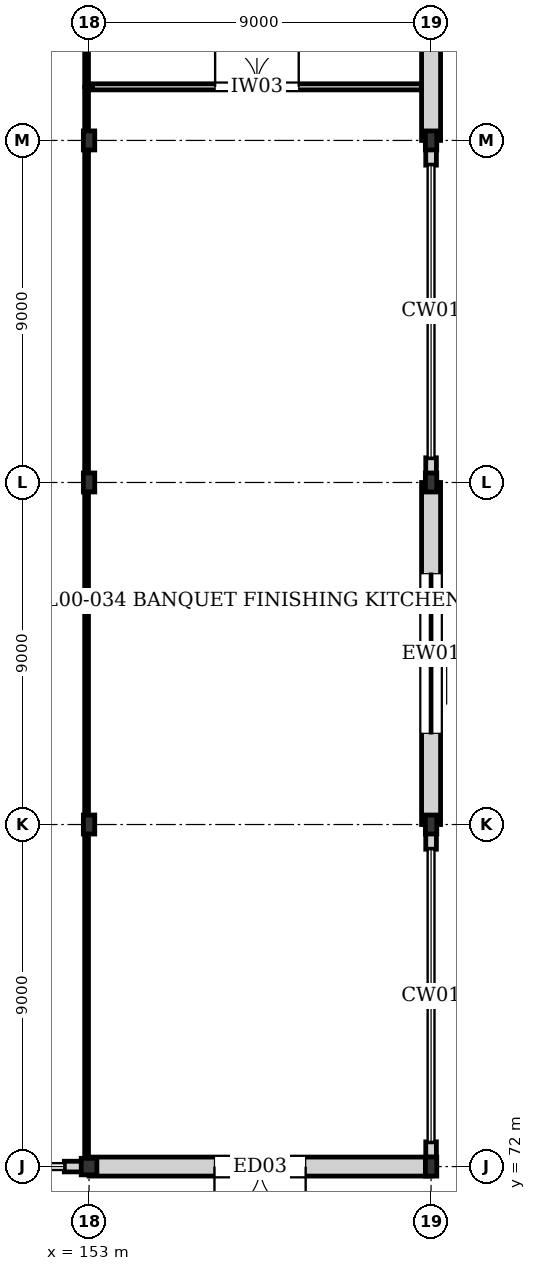
"""IFC4 building model, lengths in metres.
Left out: names, types, materials, properties, quantities, classifications, styles, units other than length and angle.
Written with IfcOpenShell. Run it as: python <this file> out.ifc"""

import sys

from ifc_helpers import new_model, si_unit, direction, frame, frame_2d, origin, origin_2d, place, context, subcontext, project, spatial, rectangle, i_section, extrude, element, fill, save


model = new_model("IFC4")
c1 = context("Model", 3, precision=1e-05, world=origin(), true_north=direction((0.0, 1.0)))
c2 = subcontext(c1, "Body", "Model", "MODEL_VIEW")
j1 = project(units=[si_unit("LENGTHUNIT", "METRE"), si_unit("PLANEANGLEUNIT", "RADIAN")], contexts=[c1])
p1 = place(None, origin())
s1 = spatial("IfcSite", under=j1, at=p1, CompositionType="ELEMENT")
p2 = place(p1, origin())
s2 = spatial("IfcBuilding", under=s1, at=p2, CompositionType="ELEMENT")
p3 = place(p2, origin())
s3 = spatial("IfcBuildingStorey", under=s2, at=p3, CompositionType="ELEMENT", Elevation=0.0)
p4 = place(p3, frame((153.0, 72.0, 0.0), z_axis=(0.0, 0.0, 1.0), x_axis=(1.0, 0.0, 0.0)))
e1 = element("IfcColumn", 1, at=p4, inside=s3, PredefinedType="COLUMN", context=c2, shape_type="SweptSolid", body=[
    extrude(i_section(OverallWidth=0.412, OverallDepth=0.435, WebThickness=0.027, FlangeThickness=0.046, at=origin_2d()), origin(), (0.0, 0.0, 1.0), 4.32),
])
for number, where, z_axis, x_axis in (
    (2, (153.0, 81.0, 0.0), (0.0, 0.0, 1.0), (1.0, 0.0, 0.0)),
    (3, (153.0, 90.0, 0.0), (0.0, 0.0, 1.0), (1.0, 0.0, 0.0)),
    (4, (153.0, 99.0, 0.0), (0.0, 0.0, 1.0), (1.0, 0.0, 0.0)),
    (5, (162.0, 72.0, 0.0), (0.0, 0.0, 1.0), (1.0, 0.0, 0.0)),
    (6, (162.0, 81.0, 0.0), (0.0, 0.0, 1.0), (1.0, 0.0, 0.0)),
    (7, (162.0, 90.0, 0.0), (0.0, 0.0, 1.0), (1.0, 0.0, 0.0)),
    (8, (162.0, 99.0, 0.0), (0.0, 0.0, 1.0), (1.0, 0.0, 0.0)),
):
    element("IfcColumn", number, at=place(p3, frame(where, z_axis=z_axis, x_axis=x_axis)), inside=s3, PredefinedType="COLUMN", context=c2, shape_type="SweptSolid", body=[
        extrude(i_section(OverallWidth=0.3, OverallDepth=0.5, WebThickness=0.014, FlangeThickness=0.028, at=origin_2d()), origin(), (0.0, 0.0, 1.0), 4.32),
    ])
p5 = place(p3, frame((162.0, 108.0, 0.0), z_axis=(0.0, 0.0, 1.0), x_axis=(0.0, -1.0, 0.0)))
e9 = element("IfcWall", 9, at=p5, inside=s3, PredefinedType="SOLIDWALL", context=c2, shape_type="SweptSolid", body=[
    extrude(rectangle(XDim=9.0, YDim=0.5, at=frame_2d((4.5, 0.0))), origin(), (0.0, 0.0, 1.0), 3.695),
])
p6 = place(p5, frame((0.7, 0.0, 0.0)))
e10 = element("IfcOpeningElement", 10, at=p6, cuts=e9, PredefinedType="OPENING", context=c2, shape_type="SweptSolid", body=[
    extrude(rectangle(XDim=1.8, YDim=2.2, at=frame_2d((0.9, 1.1))), frame((0.0, 0.26, 0.0), z_axis=(0.0, -1.0, 0.0), x_axis=(1.0, 0.0, 0.0)), (0.0, 0.0, 1.0), 0.52),
])
p7 = place(p5, frame((3.3, 0.0, 0.0)))
e11 = element("IfcOpeningElement", 11, at=p7, cuts=e9, PredefinedType="OPENING", context=c2, shape_type="SweptSolid", body=[
    extrude(rectangle(XDim=2.4, YDim=2.5, at=frame_2d((1.2, 1.25))), frame((0.0, 0.26, 0.0), z_axis=(0.0, -1.0, 0.0), x_axis=(1.0, 0.0, 0.0)), (0.0, 0.0, 1.0), 0.52),
])
for number, where, z_axis, x_axis in (
    (12, (162.0, 99.0, 0.0), (0.0, 0.0, 1.0), (0.0, -1.0, 0.0)),
    (13, (162.0, 90.65, 0.0), (0.0, 0.0, 1.0), (0.0, -1.0, 0.0)),
):
    element("IfcWall", number, at=place(p3, frame(where, z_axis=z_axis, x_axis=x_axis)), inside=s3, PredefinedType="SOLIDWALL", context=c2, shape_type="SweptSolid", body=[
        extrude(rectangle(XDim=0.65, YDim=0.28, at=frame_2d((0.325, 0.0))), origin(), (0.0, 0.0, 1.0), 3.755),
    ])
p8 = place(p3, frame((162.0, 90.0, 0.0), z_axis=(0.0, 0.0, 1.0), x_axis=(0.0, -1.0, 0.0)))
e14 = element("IfcWall", 14, at=p8, inside=s3, PredefinedType="SOLIDWALL", context=c2, shape_type="SweptSolid", body=[
    extrude(rectangle(XDim=9.0, YDim=0.5, at=frame_2d((4.5, 0.0))), origin(), (0.0, 0.0, 1.0), 4.055),
])
p9 = place(p8, frame((2.4, 0.0, 0.0)))
e15 = element("IfcOpeningElement", 15, at=p9, cuts=e14, PredefinedType="OPENING", context=c2, shape_type="SweptSolid", body=[
    extrude(rectangle(XDim=4.2, YDim=3.2, at=frame_2d((2.1, 1.6))), frame((0.0, 0.26, 0.0), z_axis=(0.0, -1.0, 0.0), x_axis=(1.0, 0.0, 0.0)), (0.0, 0.0, 1.0), 0.52),
])
p10 = place(p3, frame((162.0, 81.0, 0.0), z_axis=(0.0, 0.0, 1.0), x_axis=(0.0, -1.0, 0.0)))
e16 = element("IfcWall", 16, at=p10, inside=s3, PredefinedType="SOLIDWALL", context=c2, shape_type="SweptSolid", body=[
    extrude(rectangle(XDim=0.65, YDim=0.28, at=frame_2d((0.325, 0.0))), origin(), (0.0, 0.0, 1.0), 3.655),
])
p11 = place(p3, frame((162.0, 72.65, 0.0), z_axis=(0.0, 0.0, 1.0), x_axis=(0.0, -1.0, 0.0)))
e17 = element("IfcWall", 17, at=p11, inside=s3, PredefinedType="SOLIDWALL", context=c2, shape_type="SweptSolid", body=[
    extrude(rectangle(XDim=0.495, YDim=0.28, at=frame_2d((0.248, 0.0))), origin(), (0.0, 0.0, 1.0), 4.055),
])
p12 = place(p3, frame((162.0, 72.0, 0.0), z_axis=(0.0, 0.0, 1.0), x_axis=(-1.0, 0.0, 0.0)))
e18 = element("IfcWall", 18, at=p12, inside=s3, PredefinedType="SOLIDWALL", context=c2, shape_type="SweptSolid", body=[
    extrude(rectangle(XDim=9.0, YDim=0.5, at=frame_2d((4.5, 0.0))), origin(), (0.0, 0.0, 1.0), 3.655),
])
p13 = place(p12, frame((3.3, 0.0, 0.0)))
e19 = element("IfcOpeningElement", 19, at=p13, cuts=e18, PredefinedType="OPENING", context=c2, shape_type="SweptSolid", body=[
    extrude(rectangle(XDim=2.4, YDim=2.5, at=frame_2d((1.2, 1.25))), frame((0.0, 0.26, 0.0), z_axis=(0.0, -1.0, 0.0), x_axis=(1.0, 0.0, 0.0)), (0.0, 0.0, 1.0), 0.52),
])
p14 = place(p3, frame((153.0, 72.0, 0.0), z_axis=(0.0, 0.0, 1.0), x_axis=(-1.0, 0.0, 0.0)))
e20 = element("IfcWall", 20, at=p14, inside=s3, PredefinedType="SOLIDWALL", context=c2, shape_type="SweptSolid", body=[
    extrude(rectangle(XDim=0.65, YDim=0.28, at=frame_2d((0.325, 0.0))), origin(), (0.0, 0.0, 1.0), 3.695),
])
p15 = place(p3, frame((152.935, 100.42, 0.0), z_axis=(0.0, 0.0, 1.0), x_axis=(0.0, 1.0, 0.0)))
e21 = element("IfcWall", 21, at=p15, inside=s3, PredefinedType="PARTITIONING", context=c2, shape_type="SweptSolid", body=[
    extrude(rectangle(XDim=4.425, YDim=0.1, at=frame_2d((2.212, 0.0))), origin(), (0.0, 0.0, 1.0), 3.665),
])
p16 = place(p3, frame((152.935, 72.145, 0.0), z_axis=(0.0, 0.0, 1.0), x_axis=(0.0, 1.0, 0.0)))
e22 = element("IfcWall", 22, at=p16, inside=s3, PredefinedType="PARTITIONING", context=c2, shape_type="SweptSolid", body=[
    extrude(rectangle(XDim=8.875, YDim=0.1, at=frame_2d((4.438, 0.0))), origin(), (0.0, 0.0, 1.0), 3.365),
])
p17 = place(p3, frame((153.09, 100.41, 0.0), z_axis=(0.0, 0.0, 1.0), x_axis=(1.0, 0.0, 0.0)))
e23 = element("IfcWall", 23, at=p17, inside=s3, PredefinedType="PARTITIONING", context=c2, shape_type="SweptSolid", body=[
    extrude(rectangle(XDim=8.655, YDim=0.16, at=frame_2d((4.328, 0.0))), origin(), (0.0, 0.0, 1.0), 4.055),
])
p18 = place(p17, frame((3.228, 0.0, 0.0)))
e24 = element("IfcOpeningElement", 24, at=p18, cuts=e23, PredefinedType="OPENING", context=c2, shape_type="SweptSolid", body=[
    extrude(rectangle(XDim=2.2, YDim=2.45, at=frame_2d((1.1, 1.225))), frame((0.0, 0.09, 0.0), z_axis=(0.0, -1.0, 0.0), x_axis=(1.0, 0.0, 0.0)), (0.0, 0.0, 1.0), 0.18),
])
p19 = place(p3, frame((152.935, 81.02, 0.0), z_axis=(0.0, 0.0, 1.0), x_axis=(0.0, 1.0, 0.0)))
e25 = element("IfcWall", 25, at=p19, inside=s3, PredefinedType="PARTITIONING", context=c2, shape_type="SweptSolid", body=[
    extrude(rectangle(XDim=8.96, YDim=0.1, at=frame_2d((4.48, 0.0))), origin(), (0.0, 0.0, 1.0), 3.765),
])
p20 = place(p3, frame((152.935, 89.98, 0.0), z_axis=(0.0, 0.0, 1.0), x_axis=(0.0, 1.0, 0.0)))
e26 = element("IfcWall", 26, at=p20, inside=s3, PredefinedType="PARTITIONING", context=c2, shape_type="SweptSolid", body=[
    extrude(rectangle(XDim=9.0, YDim=0.1, at=frame_2d((4.5, 0.0))), origin(), (0.0, 0.0, 1.0), 3.725),
])
p21 = place(p3, frame((152.935, 98.98, 0.0), z_axis=(0.0, 0.0, 1.0), x_axis=(0.0, 1.0, 0.0)))
e27 = element("IfcWall", 27, at=p21, inside=s3, PredefinedType="PARTITIONING", context=c2, shape_type="SweptSolid", body=[
    extrude(rectangle(XDim=1.42, YDim=0.1, at=frame_2d((0.71, 0.0))), origin(), (0.0, 0.0, 1.0), 3.665),
])
p22 = place(p9, origin())
e28 = element("IfcDoor", 28, at=p22, inside=s3, OperationType="ROLLINGUP", PredefinedType="GATE", context=c2, shape_type="SweptSolid", body=[
    extrude(rectangle(XDim=4.2, YDim=3.2, at=frame_2d((2.1, 1.6))), frame((0.0, 0.025, 0.0), z_axis=(0.0, -1.0, 0.0), x_axis=(1.0, 0.0, 0.0)), (0.0, 0.0, 1.0), 0.05),
])
fill(e15, e28)
p23 = place(p13, origin())
e29 = element("IfcDoor", 29, at=p23, inside=s3, OperationType="DOUBLE_DOOR_SINGLE_SWING", PredefinedType="DOOR", context=c2, shape_type="SweptSolid", body=[
    extrude(rectangle(XDim=2.4, YDim=2.5, at=frame_2d((1.2, 1.25))), frame((0.0, 0.025, 0.0), z_axis=(0.0, -1.0, 0.0), x_axis=(1.0, 0.0, 0.0)), (0.0, 0.0, 1.0), 0.05),
])
fill(e19, e29)
p24 = place(p18, origin())
e30 = element("IfcDoor", 30, at=p24, inside=s3, OperationType="DOUBLE_DOOR_SINGLE_SWING", PredefinedType="DOOR", context=c2, shape_type="SweptSolid", body=[
    extrude(rectangle(XDim=2.2, YDim=2.45, at=frame_2d((1.1, 1.225))), frame((0.0, 0.025, 0.0), z_axis=(0.0, -1.0, 0.0), x_axis=(1.0, 0.0, 0.0)), (0.0, 0.0, 1.0), 0.05),
])
fill(e24, e30)
save(model, sys.argv[1])
